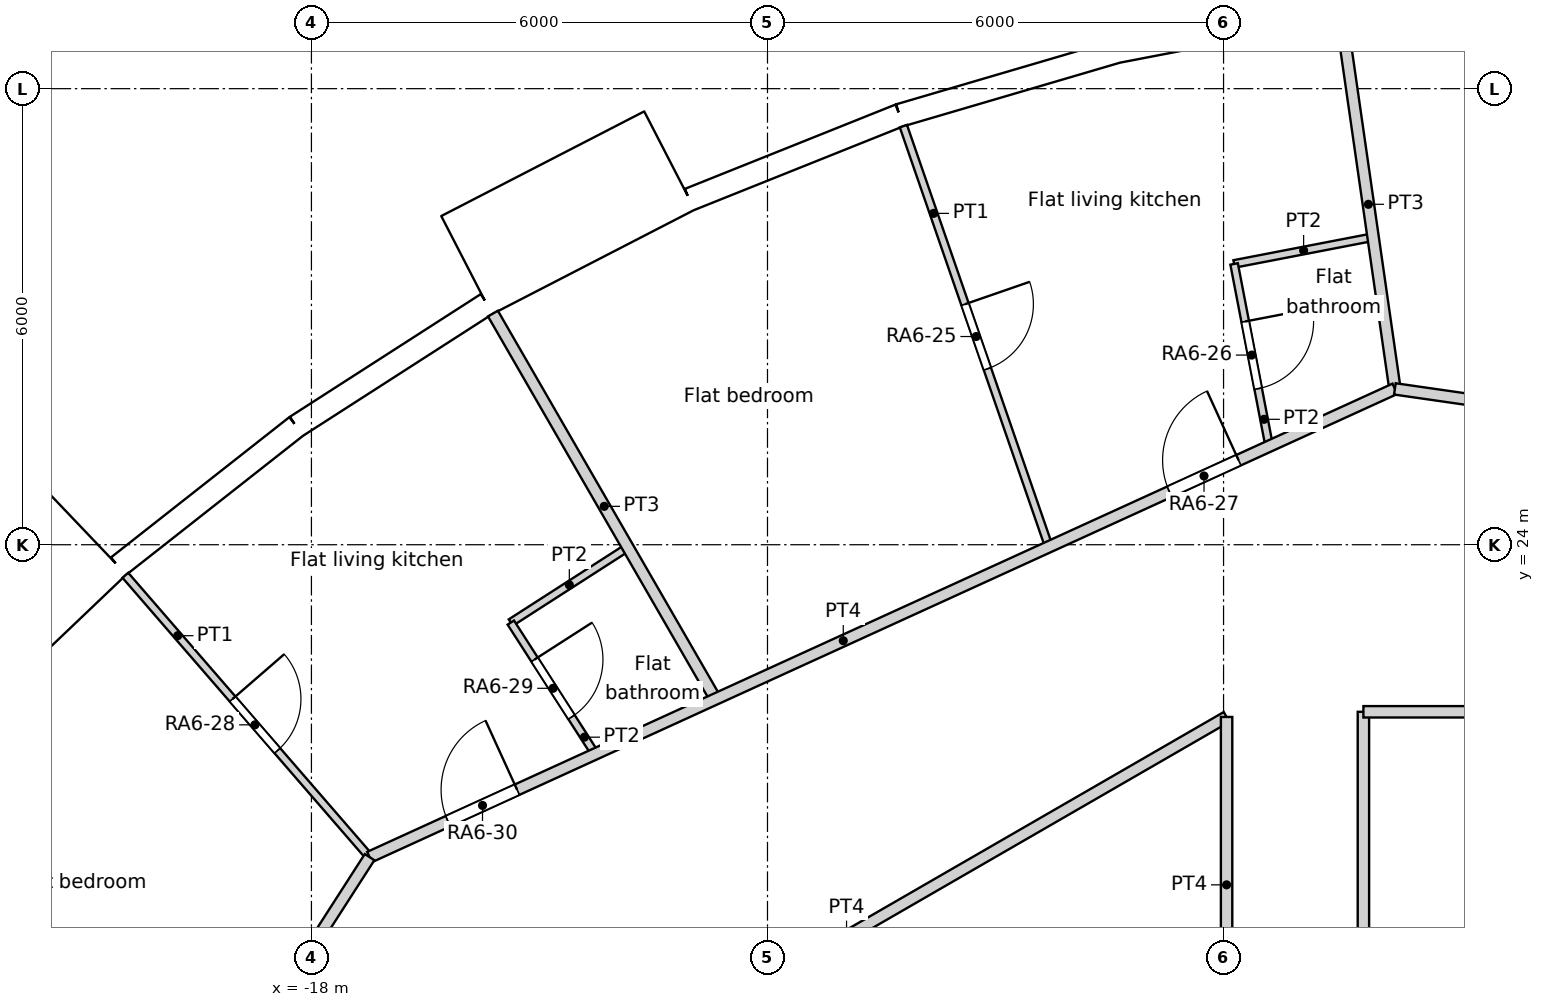
"""IFC4 building model, lengths in metres.
Left out: names, types, materials, properties, quantities, classifications, styles, units other than length and angle.
Written with IfcOpenShell. Run it as: python <this file> out.ifc"""

import sys

from ifc_helpers import new_model, si_unit, direction, frame, frame_2d, origin, origin_2d, place, context, subcontext, project, spatial, rectangle, circle, extrude, element, fill, save


model = new_model("IFC4")
c1 = context("Model", 3, precision=1e-05, world=origin(), true_north=direction((0.0, 1.0)))
c2 = subcontext(c1, "Body", "Model", "MODEL_VIEW")
j1 = project(units=[si_unit("LENGTHUNIT", "METRE"), si_unit("PLANEANGLEUNIT", "RADIAN")], contexts=[c1])
p1 = place(None, origin())
s1 = spatial("IfcSite", under=j1, at=p1, CompositionType="ELEMENT")
p2 = place(p1, origin())
s2 = spatial("IfcBuilding", under=s1, at=p2, CompositionType="ELEMENT")
p3 = place(p2, frame((0.0, 0.0, 82.2)))
s3 = spatial("IfcBuildingStorey", under=s2, at=p3, CompositionType="ELEMENT", Elevation=82.2)
for number, where, z_axis, x_axis in (
    (1, (-4.309, 29.966, 0.0), (0.0, 0.0, 1.0), (1.0, 0.0, 0.0)),
    (2, (-9.902, 28.61, 0.0), (0.0, 0.0, 1.0), (1.0, 0.0, 0.0)),
    (3, (-15.137, 26.219, 0.0), (0.0, 0.0, 1.0), (1.0, 0.0, 0.0)),
    (4, (-19.826, 22.88, 0.0), (0.0, 0.0, 1.0), (1.0, 0.0, 0.0)),
):
    element("IfcColumn", number, at=place(p3, frame(where, z_axis=z_axis, x_axis=x_axis)), inside=s3, PredefinedType="COLUMN", context=c2, shape_type="SweptSolid", body=[
        extrude(circle(Radius=0.6, at=origin_2d()), origin(), (0.0, 0.0, 1.0), 3.6),
    ])
for number, where, z_axis, x_axis in (
    (5, (-7.04, 23.516, 0.0), (0.0, 0.0, 1.0), (1.0, 0.0, 0.0)),
    (6, (-12.274, 21.259, 0.0), (0.0, 0.0, 1.0), (1.0, 0.0, 0.0)),
):
    element("IfcColumn", number, at=place(p3, frame(where, z_axis=z_axis, x_axis=x_axis)), inside=s3, PredefinedType="COLUMN", context=c2, shape_type="SweptSolid", body=[
        extrude(circle(Radius=0.65, at=origin_2d()), origin(), (0.0, 0.0, 1.0), 3.6),
    ])
p4 = place(p3, frame((-4.188, 18.35, 0.0), z_axis=(0.0, 0.0, 1.0), x_axis=(1.0, 0.0, 0.0)))
e7 = element("IfcColumn", 7, at=p4, inside=s3, PredefinedType="COLUMN", context=c2, shape_type="SweptSolid", body=[
    extrude(circle(Radius=0.7, at=origin_2d()), origin(), (0.0, 0.0, 1.0), 3.6),
])
p5 = place(p3, frame((-4.567, 31.621, -0.45), z_axis=(0.0, 0.0, 1.0), x_axis=(-0.981921602273, -0.189288052949, 0.0)))
e8 = element("IfcWall", 8, at=p5, inside=s3, PredefinedType="ELEMENTEDWALL", context=c2, shape_type="SweptSolid", body=[
    extrude(rectangle(XDim=3.0, YDim=1.45, at=frame_2d((1.5, 0.0))), origin(), (0.0, 0.0, 1.0), 3.6),
])
p6 = place(p5, frame((1.5, 0.0, 2.0)))
e9 = element("IfcOpeningElement", 9, at=p6, cuts=e8, PredefinedType="OPENING", context=c2, shape_type="SweptSolid", body=[
    extrude(circle(Radius=0.9, at=origin_2d()), frame((0.0, 0.735, 0.0), z_axis=(0.0, -1.0, 0.0), x_axis=(1.0, 0.0, 0.0)), (0.0, 0.0, 1.0), 1.47),
])
p7 = place(p3, frame((-7.403, 30.488, 0.0), z_axis=(0.0, 0.0, 1.0), x_axis=(-0.959501085144, -0.281704930036, 0.0)))
e10 = element("IfcWall", 10, at=p7, inside=s3, PredefinedType="SOLIDWALL", context=c2, shape_type="SweptSolid", body=[
    extrude(rectangle(XDim=2.979, YDim=0.3, at=frame_2d((1.49, 0.0))), origin(), (0.0, 0.0, 1.0), 3.15),
])
p8 = place(p7, frame((1.49, 0.0, 1.55)))
e11 = element("IfcOpeningElement", 11, at=p8, cuts=e10, PredefinedType="OPENING", context=c2, shape_type="SweptSolid", body=[
    extrude(circle(Radius=0.9, at=origin_2d()), frame((0.0, 0.16, 0.0), z_axis=(0.0, -1.0, 0.0), x_axis=(1.0, 0.0, 0.0)), (0.0, 0.0, 1.0), 0.32),
])
p9 = place(p3, frame((-10.261, 29.649, 0.0), z_axis=(0.0, 0.0, 1.0), x_axis=(-0.928374947, -0.371644935098, 0.0)))
e12 = element("IfcWall", 12, at=p9, inside=s3, PredefinedType="SOLIDWALL", context=c2, shape_type="SweptSolid", body=[
    extrude(rectangle(XDim=2.98, YDim=0.3, at=frame_2d((1.49, 0.0))), origin(), (0.0, 0.0, 1.0), 3.15),
])
p10 = place(p9, frame((1.49, 0.0, 1.55)))
e13 = element("IfcOpeningElement", 13, at=p10, cuts=e12, PredefinedType="OPENING", context=c2, shape_type="SweptSolid", body=[
    extrude(circle(Radius=0.9, at=origin_2d()), frame((0.0, 0.16, 0.0), z_axis=(0.0, -1.0, 0.0), x_axis=(1.0, 0.0, 0.0)), (0.0, 0.0, 1.0), 0.32),
])
p11 = place(p3, frame((-13.291, 29.053, -0.45), z_axis=(0.0, 0.0, 1.0), x_axis=(-0.888858064689, -0.458182650083, 0.0)))
e14 = element("IfcWall", 14, at=p11, inside=s3, PredefinedType="ELEMENTEDWALL", context=c2, shape_type="SweptSolid", body=[
    extrude(rectangle(XDim=3.0, YDim=1.45, at=frame_2d((1.5, 0.0))), origin(), (0.0, 0.0, 1.0), 3.6),
])
p12 = place(p11, frame((1.5, 0.0, 2.0)))
e15 = element("IfcOpeningElement", 15, at=p12, cuts=e14, PredefinedType="OPENING", context=c2, shape_type="SweptSolid", body=[
    extrude(circle(Radius=0.9, at=origin_2d()), frame((0.0, 0.735, 0.0), z_axis=(0.0, -1.0, 0.0), x_axis=(1.0, 0.0, 0.0)), (0.0, 0.0, 1.0), 1.47),
])
p13 = place(p3, frame((-15.692, 27.168, 0.0), z_axis=(0.0, 0.0, 1.0), x_axis=(-0.841260995538, -0.54062920508, 0.0)))
e16 = element("IfcWall", 16, at=p13, inside=s3, PredefinedType="SOLIDWALL", context=c2, shape_type="SweptSolid", body=[
    extrude(rectangle(XDim=2.979, YDim=0.3, at=frame_2d((1.49, 0.0))), origin(), (0.0, 0.0, 1.0), 3.15),
])
p14 = place(p13, frame((1.49, 0.0, 1.55)))
e17 = element("IfcOpeningElement", 17, at=p14, cuts=e16, PredefinedType="OPENING", context=c2, shape_type="SweptSolid", body=[
    extrude(circle(Radius=0.9, at=origin_2d()), frame((0.0, 0.16, 0.0), z_axis=(0.0, -1.0, 0.0), x_axis=(1.0, 0.0, 0.0)), (0.0, 0.0, 1.0), 0.32),
])
p15 = place(p3, frame((-18.199, 25.557, 0.0), z_axis=(0.0, 0.0, 1.0), x_axis=(-0.786053834673, -0.618158045322, 0.0)))
e18 = element("IfcWall", 18, at=p15, inside=s3, PredefinedType="SOLIDWALL", context=c2, shape_type="SweptSolid", body=[
    extrude(rectangle(XDim=2.979, YDim=0.3, at=frame_2d((1.49, 0.0))), origin(), (0.0, 0.0, 1.0), 3.15),
])
p16 = place(p15, frame((1.49, 0.0, 1.55)))
e19 = element("IfcOpeningElement", 19, at=p16, cuts=e18, PredefinedType="OPENING", context=c2, shape_type="SweptSolid", body=[
    extrude(circle(Radius=0.9, at=origin_2d()), frame((0.0, 0.16, 0.0), z_axis=(0.0, -1.0, 0.0), x_axis=(1.0, 0.0, 0.0)), (0.0, 0.0, 1.0), 0.32),
])
p17 = place(p3, frame((-20.938, 24.132, -0.45), z_axis=(0.0, 0.0, 1.0), x_axis=(-0.723712023899, -0.690102098579, 0.0)))
e20 = element("IfcWall", 20, at=p17, inside=s3, PredefinedType="ELEMENTEDWALL", context=c2, shape_type="SweptSolid", body=[
    extrude(rectangle(XDim=3.0, YDim=1.45, at=frame_2d((1.5, 0.0))), origin(), (0.0, 0.0, 1.0), 3.6),
])
p18 = place(p17, frame((1.5, 0.0, 2.0)))
e21 = element("IfcOpeningElement", 21, at=p18, cuts=e20, PredefinedType="OPENING", context=c2, shape_type="SweptSolid", body=[
    extrude(circle(Radius=0.9, at=origin_2d()), frame((0.0, 0.735, 0.0), z_axis=(0.0, -1.0, 0.0), x_axis=(1.0, 0.0, 0.0)), (0.0, 0.0, 1.0), 1.47),
])
p19 = place(p3, frame((-5.96, 11.8, 0.0), z_axis=(0.0, 0.0, 1.0), x_axis=(0.0, 1.0, 0.0)))
e22 = element("IfcWall", 22, at=p19, inside=s3, PredefinedType="PARTITIONING", context=c2, shape_type="SweptSolid", body=[
    extrude(rectangle(XDim=9.934, YDim=0.15, at=frame_2d((4.967, 0.0))), origin(), (0.0, 0.0, 1.0), 3.15),
])
p20 = place(p19, frame((4.467, 0.0, 0.0)))
e23 = element("IfcOpeningElement", 23, at=p20, cuts=e22, PredefinedType="OPENING", context=c2, shape_type="SweptSolid", body=[
    extrude(rectangle(XDim=1.0, YDim=2.04, at=frame_2d((0.5, 1.02))), frame((0.0, 0.075, 0.0), z_axis=(0.0, -1.0, 0.0), x_axis=(1.0, 0.0, 0.0)), (0.0, 0.0, 1.0), 0.15),
])
p21 = place(p3, frame((-15.96, 15.96, 0.0), z_axis=(0.0, 0.0, 1.0), x_axis=(0.86602397904, 0.500002467721, 0.0)))
e24 = element("IfcWall", 24, at=p21, inside=s3, PredefinedType="PARTITIONING", context=c2, shape_type="SweptSolid", body=[
    extrude(rectangle(XDim=11.547, YDim=0.15, at=frame_2d((5.774, 0.0))), origin(), (0.0, 0.0, 1.0), 3.15),
])
p22 = place(p3, frame((-4.16, 21.802, 0.0), z_axis=(0.0, 0.0, 1.0), x_axis=(1.0, 0.0, 0.0)))
e25 = element("IfcWall", 25, at=p22, inside=s3, PredefinedType="PARTITIONING", context=c2, shape_type="SweptSolid", body=[
    extrude(rectangle(XDim=7.736, YDim=0.15, at=frame_2d((3.868, 0.0))), origin(), (0.0, 0.0, 1.0), 3.15),
])
p23 = place(p3, frame((-4.16, 11.8, 0.0), z_axis=(0.0, 0.0, 1.0), x_axis=(0.0, 1.0, 0.0)))
e26 = element("IfcWall", 26, at=p23, inside=s3, PredefinedType="PARTITIONING", context=c2, shape_type="SweptSolid", body=[
    extrude(rectangle(XDim=10.002, YDim=0.15, at=frame_2d((5.001, 0.0))), origin(), (0.0, 0.0, 1.0), 3.15),
])
p24 = place(p3, frame((-3.746, 26.05, 0.0), z_axis=(0.0, 0.0, 1.0), x_axis=(0.989832601965, -0.14223719657, 0.0)))
e27 = element("IfcWall", 27, at=p24, inside=s3, PredefinedType="PARTITIONING", context=c2, shape_type="SweptSolid", body=[
    extrude(rectangle(XDim=14.83, YDim=0.15, at=frame_2d((7.415, 0.0))), origin(), (0.0, 0.0, 1.0), 3.15),
])
p25 = place(p24, frame((6.054, 0.0, 0.0)))
e28 = element("IfcOpeningElement", 28, at=p25, cuts=e27, PredefinedType="OPENING", context=c2, shape_type="SweptSolid", body=[
    extrude(rectangle(XDim=1.0, YDim=2.1, at=frame_2d((0.5, 1.05))), frame((0.0, 0.075, 0.0), z_axis=(0.0, -1.0, 0.0), x_axis=(1.0, 0.0, 0.0)), (0.0, 0.0, 1.0), 0.15),
])
p26 = place(p3, frame((-17.236, 19.891, 0.0), z_axis=(0.0, 0.0, 1.0), x_axis=(0.909645678785, 0.415385049163, 0.0)))
e29 = element("IfcWall", 29, at=p26, inside=s3, PredefinedType="PARTITIONING", context=c2, shape_type="SweptSolid", body=[
    extrude(rectangle(XDim=14.829, YDim=0.15, at=frame_2d((7.415, 0.0))), origin(), (0.0, 0.0, 1.0), 3.15),
])
p27 = place(p26, frame((11.569, 0.0, 0.0)))
e30 = element("IfcOpeningElement", 30, at=p27, cuts=e29, PredefinedType="OPENING", context=c2, shape_type="SweptSolid", body=[
    extrude(rectangle(XDim=1.0, YDim=2.1, at=frame_2d((0.5, 1.05))), frame((0.0, 0.075, 0.0), z_axis=(0.0, -1.0, 0.0), x_axis=(1.0, 0.0, 0.0)), (0.0, 0.0, 1.0), 0.15),
])
p28 = place(p26, frame((1.134, 0.0, 0.0)))
e31 = element("IfcOpeningElement", 31, at=p28, cuts=e29, PredefinedType="OPENING", context=c2, shape_type="SweptSolid", body=[
    extrude(rectangle(XDim=1.0, YDim=2.1, at=frame_2d((0.5, 1.05))), frame((0.0, 0.075, 0.0), z_axis=(0.0, -1.0, 0.0), x_axis=(1.0, 0.0, 0.0)), (0.0, 0.0, 1.0), 0.15),
])
p29 = place(p3, frame((-25.255, 7.416, 0.0), z_axis=(0.0, 0.0, 1.0), x_axis=(0.540805851332, 0.841147449123, 0.0)))
e32 = element("IfcWall", 32, at=p29, inside=s3, PredefinedType="PARTITIONING", context=c2, shape_type="SweptSolid", body=[
    extrude(rectangle(XDim=14.829, YDim=0.15, at=frame_2d((7.415, 0.0))), origin(), (0.0, 0.0, 1.0), 3.15),
])
p30 = place(p29, frame((5.603, 0.0, 0.0)))
e33 = element("IfcOpeningElement", 33, at=p30, cuts=e32, PredefinedType="OPENING", context=c2, shape_type="SweptSolid", body=[
    extrude(rectangle(XDim=1.0, YDim=2.1, at=frame_2d((0.5, 1.05))), frame((0.0, 0.075, 0.0), z_axis=(0.0, -1.0, 0.0), x_axis=(1.0, 0.0, 0.0)), (0.0, 0.0, 1.0), 0.15),
])
p31 = place(p29, frame((3.013, 0.0, 0.0)))
e34 = element("IfcOpeningElement", 34, at=p31, cuts=e32, PredefinedType="OPENING", context=c2, shape_type="SweptSolid", body=[
    extrude(rectangle(XDim=1.0, YDim=2.1, at=frame_2d((0.5, 1.05))), frame((0.0, 0.075, 0.0), z_axis=(0.0, -1.0, 0.0), x_axis=(1.0, 0.0, 0.0)), (0.0, 0.0, 1.0), 0.15),
])
p32 = place(p3, frame((-4.444, 30.906, 0.0), z_axis=(0.0, 0.0, 1.0), x_axis=(0.142452592463, -0.989801626035, 0.0)))
e35 = element("IfcWall", 35, at=p32, inside=s3, PredefinedType="PARTITIONING", context=c2, shape_type="SweptSolid", body=[
    extrude(rectangle(XDim=4.905, YDim=0.15, at=frame_2d((2.453, 0.0))), origin(), (0.0, 0.0, 1.0), 3.15),
])
p33 = place(p3, frame((-10.212, 29.507, 0.0), z_axis=(0.0, 0.0, 1.0), x_axis=(0.32692444056, -0.94505048022, 0.0)))
e36 = element("IfcWall", 36, at=p33, inside=s3, PredefinedType="PARTITIONING", context=c2, shape_type="SweptSolid", body=[
    extrude(rectangle(XDim=5.857, YDim=0.1, at=frame_2d((2.928, 0.0))), origin(), (0.0, 0.0, 1.0), 3.15),
])
p34 = place(p33, frame((2.479, 0.0, 0.0)))
e37 = element("IfcOpeningElement", 37, at=p34, cuts=e36, PredefinedType="OPENING", context=c2, shape_type="SweptSolid", body=[
    extrude(rectangle(XDim=0.9, YDim=2.1, at=frame_2d((0.45, 1.05))), frame((0.0, 0.05, 0.0), z_axis=(0.0, -1.0, 0.0), x_axis=(1.0, 0.0, 0.0)), (0.0, 0.0, 1.0), 0.1),
])
p35 = place(p3, frame((-5.861, 27.694, 0.0), z_axis=(0.0, 0.0, 1.0), x_axis=(0.981879093558, 0.189508431565, 0.0)))
e38 = element("IfcWall", 38, at=p35, inside=s3, PredefinedType="PARTITIONING", context=c2, shape_type="SweptSolid", body=[
    extrude(rectangle(XDim=1.863, YDim=0.1, at=frame_2d((0.931, 0.0))), origin(), (0.0, 0.0, 1.0), 3.15),
])
p36 = place(p3, frame((-5.861, 27.694, 0.0), z_axis=(0.0, 0.0, 1.0), x_axis=(0.189229262293, -0.981932933704, 0.0)))
e39 = element("IfcWall", 39, at=p36, inside=s3, PredefinedType="PARTITIONING", context=c2, shape_type="SweptSolid", body=[
    extrude(rectangle(XDim=2.442, YDim=0.1, at=frame_2d((1.221, 0.0))), origin(), (0.0, 0.0, 1.0), 3.15),
])
p37 = place(p36, frame((0.771, 0.0, 0.0)))
e40 = element("IfcOpeningElement", 40, at=p37, cuts=e39, PredefinedType="OPENING", context=c2, shape_type="SweptSolid", body=[
    extrude(rectangle(XDim=0.9, YDim=2.0, at=frame_2d((0.45, 1.0))), frame((0.0, 0.05, 0.0), z_axis=(0.0, -1.0, 0.0), x_axis=(1.0, 0.0, 0.0)), (0.0, 0.0, 1.0), 0.1),
])
p38 = place(p3, frame((-15.612, 27.041, 0.0), z_axis=(0.0, 0.0, 1.0), x_axis=(0.499985873194, -0.866033559746, 0.0)))
e41 = element("IfcWall", 41, at=p38, inside=s3, PredefinedType="PARTITIONING", context=c2, shape_type="SweptSolid", body=[
    extrude(rectangle(XDim=5.857, YDim=0.15, at=frame_2d((2.928, 0.0))), origin(), (0.0, 0.0, 1.0), 3.15),
])
p39 = place(p3, frame((-20.448, 23.598, 0.0), z_axis=(0.0, 0.0, 1.0), x_axis=(0.654847179409, -0.755761319214, 0.0)))
e42 = element("IfcWall", 42, at=p39, inside=s3, PredefinedType="PARTITIONING", context=c2, shape_type="SweptSolid", body=[
    extrude(rectangle(XDim=4.906, YDim=0.1, at=frame_2d((2.453, 0.0))), origin(), (0.0, 0.0, 1.0), 3.15),
])
p40 = place(p39, frame((2.153, 0.0, 0.0)))
e43 = element("IfcOpeningElement", 43, at=p40, cuts=e42, PredefinedType="OPENING", context=c2, shape_type="SweptSolid", body=[
    extrude(rectangle(XDim=0.9, YDim=2.1, at=frame_2d((0.45, 1.05))), frame((0.0, 0.05, 0.0), z_axis=(0.0, -1.0, 0.0), x_axis=(1.0, 0.0, 0.0)), (0.0, 0.0, 1.0), 0.1),
])
p41 = place(p3, frame((-15.377, 22.976, 0.0), z_axis=(0.0, 0.0, 1.0), x_axis=(0.84118714077, 0.540744111576, 0.0)))
e44 = element("IfcWall", 44, at=p41, inside=s3, PredefinedType="PARTITIONING", context=c2, shape_type="SweptSolid", body=[
    extrude(rectangle(XDim=1.831, YDim=0.1, at=frame_2d((0.916, 0.0))), origin(), (0.0, 0.0, 1.0), 3.15),
])
p42 = place(p3, frame((-15.377, 22.976, 0.0), z_axis=(0.0, 0.0, 1.0), x_axis=(0.54031338164, -0.841463873033, 0.0)))
e45 = element("IfcWall", 45, at=p42, inside=s3, PredefinedType="PARTITIONING", context=c2, shape_type="SweptSolid", body=[
    extrude(rectangle(XDim=2.056, YDim=0.1, at=frame_2d((1.028, 0.0))), origin(), (0.0, 0.0, 1.0), 3.15),
])
p43 = place(p42, frame((0.578, 0.0, 0.0)))
e46 = element("IfcOpeningElement", 46, at=p43, cuts=e45, PredefinedType="OPENING", context=c2, shape_type="SweptSolid", body=[
    extrude(rectangle(XDim=0.9, YDim=2.0, at=frame_2d((0.45, 1.0))), frame((0.0, 0.05, 0.0), z_axis=(0.0, -1.0, 0.0), x_axis=(1.0, 0.0, 0.0)), (0.0, 0.0, 1.0), 0.1),
])
p44 = place(p3, frame((-24.544, 19.302, 0.0), z_axis=(0.0, 0.0, 1.0), x_axis=(0.786034767432, -0.618182290581, 0.0)))
e47 = element("IfcWall", 47, at=p44, inside=s3, PredefinedType="PARTITIONING", context=c2, shape_type="SweptSolid", body=[
    extrude(rectangle(XDim=5.857, YDim=0.15, at=frame_2d((2.929, 0.0))), origin(), (0.0, 0.0, 1.0), 3.15),
])
p45 = place(p6, origin())
e48 = element("IfcWindow", 48, at=p45, inside=s3, PartitioningType="SINGLE_PANEL", PredefinedType="WINDOW", context=c2, shape_type="SweptSolid", body=[
    extrude(circle(Radius=0.9, at=origin_2d()), frame((0.0, 0.695, 0.0), z_axis=(0.0, -1.0, 0.0), x_axis=(1.0, 0.0, 0.0)), (0.0, 0.0, 1.0), 0.1),
])
fill(e9, e48)
p46 = place(p8, origin())
e49 = element("IfcWindow", 49, at=p46, inside=s3, PartitioningType="SINGLE_PANEL", PredefinedType="WINDOW", context=c2, shape_type="SweptSolid", body=[
    extrude(circle(Radius=0.9, at=origin_2d()), frame((0.0, 0.12, 0.0), z_axis=(0.0, -1.0, 0.0), x_axis=(1.0, 0.0, 0.0)), (0.0, 0.0, 1.0), 0.1),
])
fill(e11, e49)
p47 = place(p10, origin())
e50 = element("IfcWindow", 50, at=p47, inside=s3, PartitioningType="SINGLE_PANEL", PredefinedType="WINDOW", context=c2, shape_type="SweptSolid", body=[
    extrude(circle(Radius=0.9, at=origin_2d()), frame((0.0, 0.12, 0.0), z_axis=(0.0, -1.0, 0.0), x_axis=(1.0, 0.0, 0.0)), (0.0, 0.0, 1.0), 0.1),
])
fill(e13, e50)
p48 = place(p12, origin())
e51 = element("IfcWindow", 51, at=p48, inside=s3, PartitioningType="SINGLE_PANEL", PredefinedType="WINDOW", context=c2, shape_type="SweptSolid", body=[
    extrude(circle(Radius=0.9, at=origin_2d()), frame((0.0, 0.695, 0.0), z_axis=(0.0, -1.0, 0.0), x_axis=(1.0, 0.0, 0.0)), (0.0, 0.0, 1.0), 0.1),
])
fill(e15, e51)
p49 = place(p14, origin())
e52 = element("IfcWindow", 52, at=p49, inside=s3, PartitioningType="SINGLE_PANEL", PredefinedType="WINDOW", context=c2, shape_type="SweptSolid", body=[
    extrude(circle(Radius=0.9, at=origin_2d()), frame((0.0, 0.12, 0.0), z_axis=(0.0, -1.0, 0.0), x_axis=(1.0, 0.0, 0.0)), (0.0, 0.0, 1.0), 0.1),
])
fill(e17, e52)
p50 = place(p16, origin())
e53 = element("IfcWindow", 53, at=p50, inside=s3, PartitioningType="SINGLE_PANEL", PredefinedType="WINDOW", context=c2, shape_type="SweptSolid", body=[
    extrude(circle(Radius=0.9, at=origin_2d()), frame((0.0, 0.12, 0.0), z_axis=(0.0, -1.0, 0.0), x_axis=(1.0, 0.0, 0.0)), (0.0, 0.0, 1.0), 0.1),
])
fill(e19, e53)
p51 = place(p18, origin())
e54 = element("IfcWindow", 54, at=p51, inside=s3, PartitioningType="SINGLE_PANEL", PredefinedType="WINDOW", context=c2, shape_type="SweptSolid", body=[
    extrude(circle(Radius=0.9, at=origin_2d()), frame((0.0, 0.695, 0.0), z_axis=(0.0, -1.0, 0.0), x_axis=(1.0, 0.0, 0.0)), (0.0, 0.0, 1.0), 0.1),
])
fill(e21, e54)
p52 = place(p34, origin())
e55 = element("IfcDoor", 55, at=p52, inside=s3, OperationType="SINGLE_SWING_LEFT", PredefinedType="DOOR", context=c2, shape_type="SweptSolid", body=[
    extrude(rectangle(XDim=0.9, YDim=2.1, at=frame_2d((0.45, 1.05))), frame((0.0, 0.025, 0.0), z_axis=(0.0, -1.0, 0.0), x_axis=(1.0, 0.0, 0.0)), (0.0, 0.0, 1.0), 0.05),
])
fill(e37, e55)
p53 = place(p37, origin())
e56 = element("IfcDoor", 56, at=p53, inside=s3, OperationType="SINGLE_SWING_LEFT", PredefinedType="DOOR", context=c2, shape_type="SweptSolid", body=[
    extrude(rectangle(XDim=0.9, YDim=2.0, at=frame_2d((0.45, 1.0))), frame((0.0, 0.025, 0.0), z_axis=(0.0, -1.0, 0.0), x_axis=(1.0, 0.0, 0.0)), (0.0, 0.0, 1.0), 0.05),
])
fill(e40, e56)
p54 = place(p27, origin())
e57 = element("IfcDoor", 57, at=p54, inside=s3, OperationType="SINGLE_SWING_RIGHT", PredefinedType="DOOR", context=c2, shape_type="SweptSolid", body=[
    extrude(rectangle(XDim=1.0, YDim=2.1, at=frame_2d((0.5, 1.05))), frame((0.0, 0.025, 0.0), z_axis=(0.0, -1.0, 0.0), x_axis=(1.0, 0.0, 0.0)), (0.0, 0.0, 1.0), 0.05),
])
fill(e30, e57)
p55 = place(p40, origin())
e58 = element("IfcDoor", 58, at=p55, inside=s3, OperationType="SINGLE_SWING_LEFT", PredefinedType="DOOR", context=c2, shape_type="SweptSolid", body=[
    extrude(rectangle(XDim=0.9, YDim=2.1, at=frame_2d((0.45, 1.05))), frame((0.0, 0.025, 0.0), z_axis=(0.0, -1.0, 0.0), x_axis=(1.0, 0.0, 0.0)), (0.0, 0.0, 1.0), 0.05),
])
fill(e43, e58)
p56 = place(p43, origin())
e59 = element("IfcDoor", 59, at=p56, inside=s3, OperationType="SINGLE_SWING_LEFT", PredefinedType="DOOR", context=c2, shape_type="SweptSolid", body=[
    extrude(rectangle(XDim=0.9, YDim=2.0, at=frame_2d((0.45, 1.0))), frame((0.0, 0.025, 0.0), z_axis=(0.0, -1.0, 0.0), x_axis=(1.0, 0.0, 0.0)), (0.0, 0.0, 1.0), 0.05),
])
fill(e46, e59)
p57 = place(p28, origin())
e60 = element("IfcDoor", 60, at=p57, inside=s3, OperationType="SINGLE_SWING_RIGHT", PredefinedType="DOOR", context=c2, shape_type="SweptSolid", body=[
    extrude(rectangle(XDim=1.0, YDim=2.1, at=frame_2d((0.5, 1.05))), frame((0.0, 0.025, 0.0), z_axis=(0.0, -1.0, 0.0), x_axis=(1.0, 0.0, 0.0)), (0.0, 0.0, 1.0), 0.05),
])
fill(e31, e60)
save(model, sys.argv[1])
